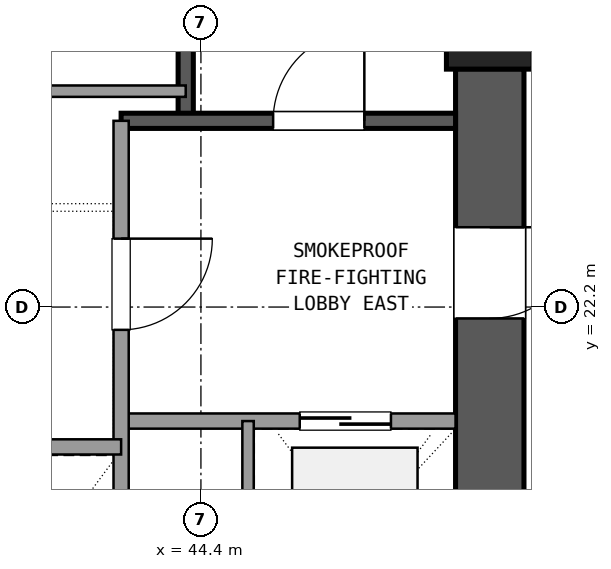
"""IFC4 building model, lengths in metres.
Left out: names, types, materials, properties, quantities, classifications, styles, units other than length and angle.
Written with IfcOpenShell. Run it as: python <this file> out.ifc"""

import sys

from ifc_helpers import new_model, si_unit, direction, frame, frame_2d, origin, origin_2d, place, context, subcontext, project, spatial, rectangle, extrude, element, fill, save


model = new_model("IFC4")
c1 = context("Model", 3, precision=1e-05, world=origin(), true_north=direction((0.0, 1.0)))
c2 = subcontext(c1, "Body", "Model", "MODEL_VIEW")
j1 = project(units=[si_unit("LENGTHUNIT", "METRE"), si_unit("PLANEANGLEUNIT", "RADIAN")], contexts=[c1])
p1 = place(None, origin())
s1 = spatial("IfcSite", under=j1, at=p1, CompositionType="ELEMENT")
p2 = place(p1, origin())
s2 = spatial("IfcBuilding", under=s1, at=p2, CompositionType="ELEMENT")
p3 = place(p2, frame((0.0, 0.0, 45.54)))
s3 = spatial("IfcBuildingStorey", under=s2, at=p3, CompositionType="ELEMENT", Elevation=45.54)
p4 = place(p3, frame((48.2, 25.9, 0.0), z_axis=(0.0, 0.0, 1.0), x_axis=(1.0, 0.0, 0.0)))
e1 = element("IfcColumn", 1, at=p4, inside=s3, PredefinedType="COLUMN", context=c2, shape_type="SweptSolid", body=[
    extrude(rectangle(XDim=1.14, YDim=1.14, at=origin_2d()), origin(), (0.0, 0.0, 1.0), 3.6),
])
p5 = place(p3, frame((48.2, 17.865, 0.0), z_axis=(0.0, 0.0, 1.0), x_axis=(0.0, 1.0, 0.0)))
e2 = element("IfcWall", 2, at=p5, inside=s3, PredefinedType="SHEAR", context=c2, shape_type="SweptSolid", body=[
    extrude(rectangle(XDim=7.47, YDim=0.9, at=frame_2d((3.735, 0.0))), origin(), (0.0, 0.0, 1.0), 3.32),
])
p6 = place(p5, frame((4.185, 0.0, 0.0)))
e3 = element("IfcOpeningElement", 3, at=p6, cuts=e2, PredefinedType="OPENING", context=c2, shape_type="SweptSolid", body=[
    extrude(rectangle(XDim=1.2, YDim=2.15, at=frame_2d((0.6, 1.075))), frame((0.0, 0.46, 0.0), z_axis=(0.0, -1.0, 0.0), x_axis=(1.0, 0.0, 0.0)), (0.0, 0.0, 1.0), 0.92),
])
p7 = place(p3, frame((44.2, 24.65, 0.0), z_axis=(0.0, 0.0, 1.0), x_axis=(0.0, 1.0, 0.0)))
e4 = element("IfcWall", 4, at=p7, inside=s3, PredefinedType="SHEAR", context=c2, shape_type="SweptSolid", body=[
    extrude(rectangle(XDim=9.4, YDim=0.2, at=frame_2d((4.7, 0.0))), origin(), (0.0, 0.0, 1.0), 3.32),
])
p8 = place(p3, frame((43.35, 24.65, 0.0), z_axis=(0.0, 0.0, 1.0), x_axis=(1.0, 0.0, 0.0)))
e5 = element("IfcWall", 5, at=p8, inside=s3, PredefinedType="SHEAR", context=c2, shape_type="SweptSolid", body=[
    extrude(rectangle(XDim=4.4, YDim=0.2, at=frame_2d((2.2, 0.0))), origin(), (0.0, 0.0, 1.0), 3.32),
])
p9 = place(p8, frame((2.0, 0.0, 0.0)))
e6 = element("IfcOpeningElement", 6, at=p9, cuts=e5, PredefinedType="OPENING", context=c2, shape_type="SweptSolid", body=[
    extrude(rectangle(XDim=1.2, YDim=2.15, at=frame_2d((0.6, 1.075))), frame((0.0, 0.11, 0.0), z_axis=(0.0, -1.0, 0.0), x_axis=(1.0, 0.0, 0.0)), (0.0, 0.0, 1.0), 0.22),
])
p10 = place(p3, frame((43.35, 20.7, 0.0), z_axis=(0.0, 0.0, 1.0), x_axis=(1.0, 0.0, 0.0)))
e7 = element("IfcWall", 7, at=p10, inside=s3, PredefinedType="SOLIDWALL", context=c2, shape_type="SweptSolid", body=[
    extrude(rectangle(XDim=4.4, YDim=0.2, at=frame_2d((2.2, 0.0))), origin(), (0.0, 0.0, 1.0), 2.61),
])
p11 = place(p10, frame((2.35, 0.0, 0.0)))
e8 = element("IfcOpeningElement", 8, at=p11, cuts=e7, PredefinedType="OPENING", context=c2, shape_type="SweptSolid", body=[
    extrude(rectangle(XDim=1.2, YDim=2.15, at=frame_2d((0.6, 1.075))), frame((0.0, 0.11, 0.0), z_axis=(0.0, -1.0, 0.0), x_axis=(1.0, 0.0, 0.0)), (0.0, 0.0, 1.0), 0.22),
])
p12 = place(p3, frame((43.35, 17.75, 0.0), z_axis=(0.0, 0.0, 1.0), x_axis=(0.0, 1.0, 0.0)))
e9 = element("IfcWall", 9, at=p12, inside=s3, PredefinedType="SOLIDWALL", context=c2, shape_type="SweptSolid", body=[
    extrude(rectangle(XDim=6.9, YDim=0.2, at=frame_2d((3.45, 0.0))), origin(), (0.0, 0.0, 1.0), 2.61),
])
p13 = place(p12, frame((4.15, 0.0, 0.0)))
e10 = element("IfcOpeningElement", 10, at=p13, cuts=e9, PredefinedType="OPENING", context=c2, shape_type="SweptSolid", body=[
    extrude(rectangle(XDim=1.2, YDim=2.15, at=frame_2d((0.6, 1.075))), frame((0.0, 0.11, 0.0), z_axis=(0.0, -1.0, 0.0), x_axis=(1.0, 0.0, 0.0)), (0.0, 0.0, 1.0), 0.22),
])
p14 = place(p3, frame((45.02, 17.75, 0.0), z_axis=(0.0, 0.0, 1.0), x_axis=(0.0, 1.0, 0.0)))
e11 = element("IfcWall", 11, at=p14, inside=s3, PredefinedType="PARTITIONING", context=c2, shape_type="SweptSolid", body=[
    extrude(rectangle(XDim=2.95, YDim=0.15, at=frame_2d((1.475, 0.0))), origin(), (0.0, 0.0, 1.0), 2.61),
])
p15 = place(p3, frame((37.25, 20.36, 0.0), z_axis=(0.0, 0.0, 1.0), x_axis=(1.0, 0.0, 0.0)))
e12 = element("IfcWall", 12, at=p15, inside=s3, PredefinedType="SOLIDWALL", context=c2, shape_type="SweptSolid", body=[
    extrude(rectangle(XDim=6.1, YDim=0.2, at=frame_2d((3.05, 0.0))), origin(), (0.0, 0.0, 1.0), 2.61),
])
p16 = place(p3, frame((42.27, 25.04, 0.0), z_axis=(0.0, 0.0, 1.0), x_axis=(1.0, 0.0, 0.0)))
e13 = element("IfcWall", 13, at=p16, inside=s3, PredefinedType="PARTITIONING", context=c2, shape_type="SweptSolid", body=[
    extrude(rectangle(XDim=1.93, YDim=0.15, at=frame_2d((0.965, 0.0))), origin(), (0.0, 0.0, 1.0), 2.61),
])
p17 = place(p9, origin())
e14 = element("IfcDoor", 14, at=p17, inside=s3, OperationType="SINGLE_SWING_RIGHT", PredefinedType="DOOR", context=c2, shape_type="SweptSolid", body=[
    extrude(rectangle(XDim=1.2, YDim=2.15, at=frame_2d((0.6, 1.075))), frame((0.0, 0.025, 0.0), z_axis=(0.0, -1.0, 0.0), x_axis=(1.0, 0.0, 0.0)), (0.0, 0.0, 1.0), 0.05),
])
fill(e6, e14)
p18 = place(p11, origin())
e15 = element("IfcDoor", 15, at=p18, inside=s3, OperationType="SLIDING_TO_RIGHT", PredefinedType="DOOR", context=c2, shape_type="SweptSolid", body=[
    extrude(rectangle(XDim=1.2, YDim=2.15, at=frame_2d((0.6, 1.075))), frame((0.0, 0.025, 0.0), z_axis=(0.0, -1.0, 0.0), x_axis=(1.0, 0.0, 0.0)), (0.0, 0.0, 1.0), 0.05),
])
fill(e8, e15)
p19 = place(p13, frame((1.2, 0.0, 0.0), z_axis=(0.0, 0.0, 1.0), x_axis=(-1.0, 0.0, 0.0)))
e16 = element("IfcDoor", 16, at=p19, inside=s3, OperationType="SINGLE_SWING_RIGHT", PredefinedType="DOOR", context=c2, shape_type="SweptSolid", body=[
    extrude(rectangle(XDim=1.2, YDim=2.15, at=frame_2d((0.6, 1.075))), frame((0.0, 0.025, 0.0), z_axis=(0.0, -1.0, 0.0), x_axis=(1.0, 0.0, 0.0)), (0.0, 0.0, 1.0), 0.05),
])
fill(e10, e16)
p20 = place(p6, frame((1.2, 0.0, 0.0), z_axis=(0.0, 0.0, 1.0), x_axis=(-1.0, 0.0, 0.0)))
e17 = element("IfcDoor", 17, at=p20, inside=s3, OperationType="SINGLE_SWING_RIGHT", PredefinedType="DOOR", context=c2, shape_type="SweptSolid", body=[
    extrude(rectangle(XDim=1.2, YDim=2.15, at=frame_2d((0.6, 1.075))), frame((0.0, 0.025, 0.0), z_axis=(0.0, -1.0, 0.0), x_axis=(1.0, 0.0, 0.0)), (0.0, 0.0, 1.0), 0.05),
])
fill(e3, e17)
save(model, sys.argv[1])
